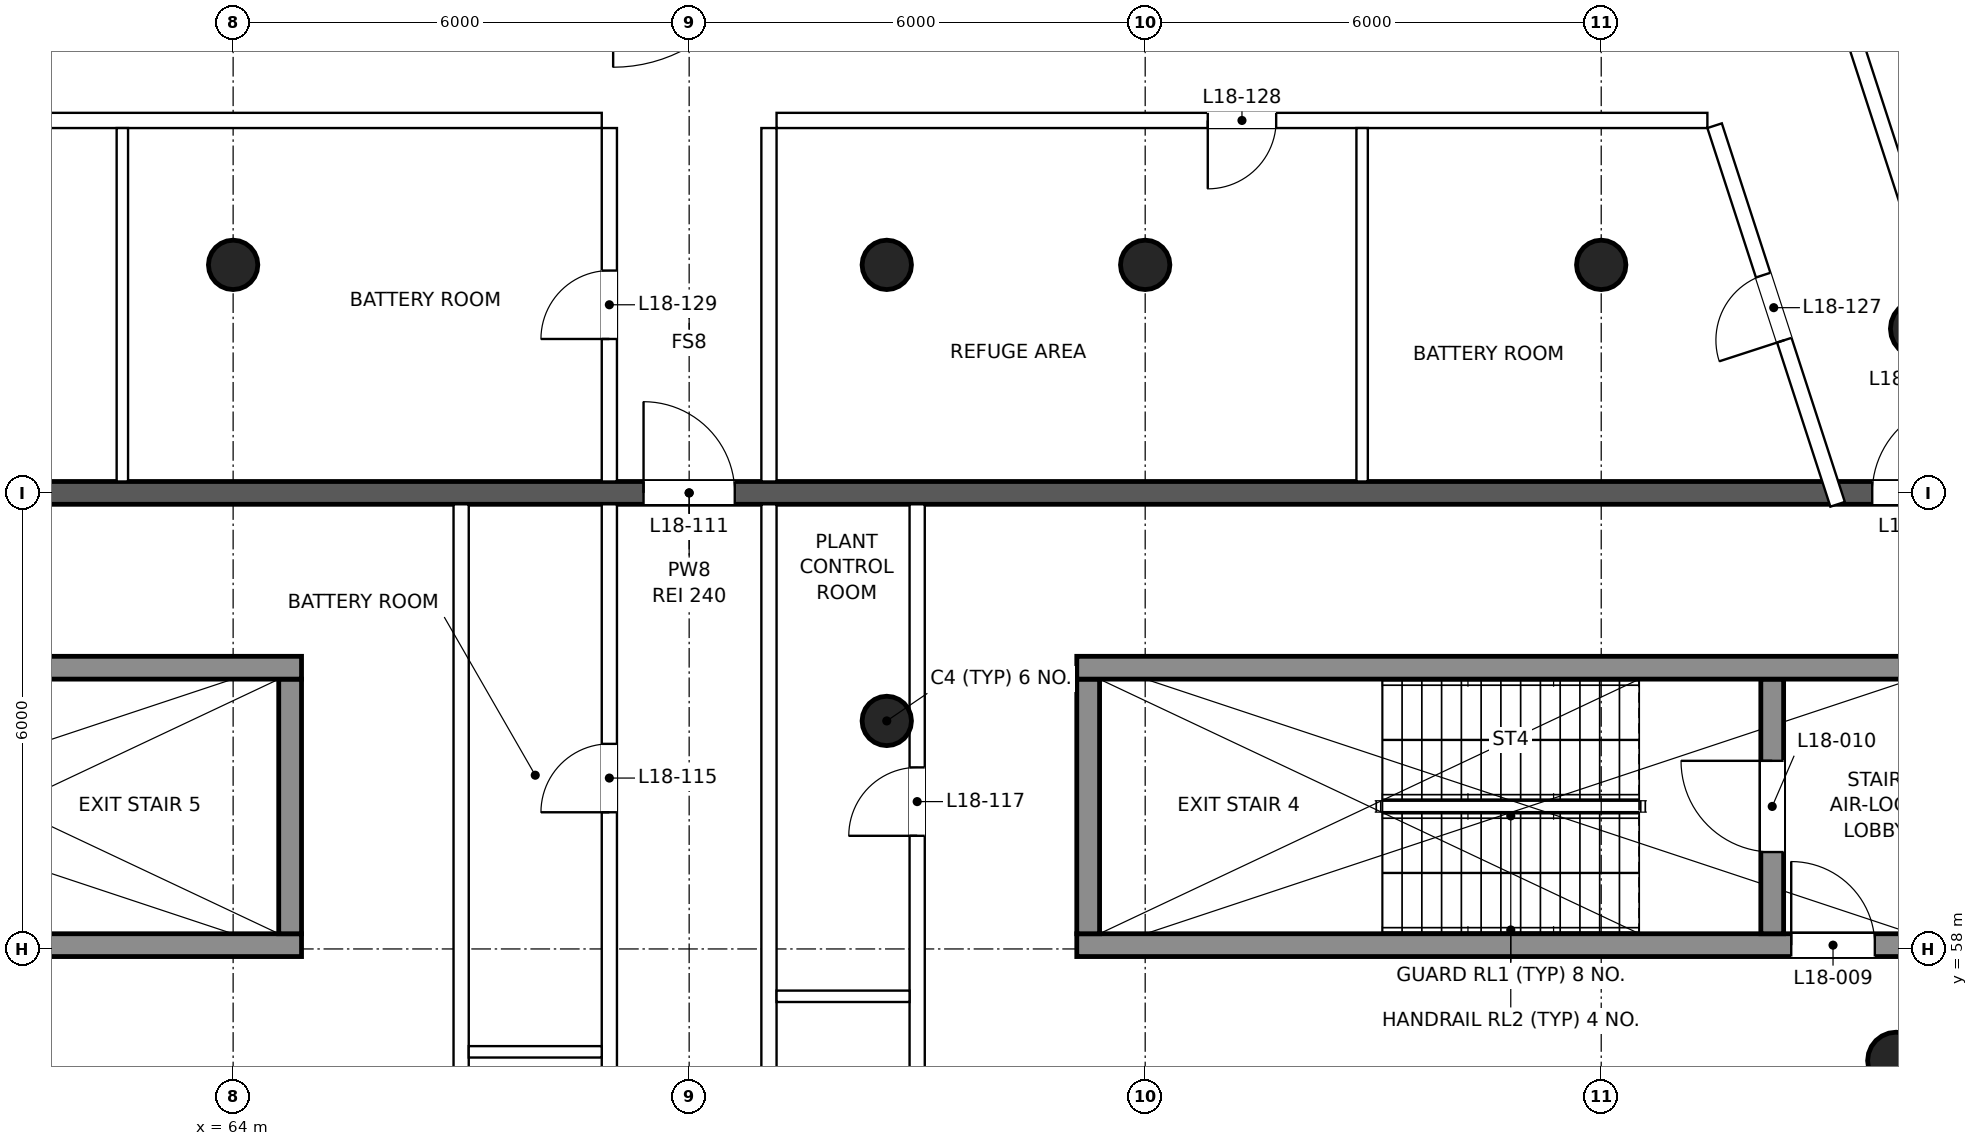
"""IFC4 building model, lengths in metres.
Left out: names, types, materials, properties, quantities, classifications, styles, units other than length and angle.
Written with IfcOpenShell. Run it as: python <this file> out.ifc"""

import sys

from ifc_helpers import new_model, si_unit, direction, frame, frame_2d, origin, origin_2d, place, context, subcontext, project, spatial, rectangle, circle, extrude, element, fill, save


model = new_model("IFC4")
c1 = context("Model", 3, precision=1e-05, world=origin(), true_north=direction((0.0, 1.0)))
c2 = subcontext(c1, "Body", "Model", "MODEL_VIEW")
j1 = project(units=[si_unit("LENGTHUNIT", "METRE"), si_unit("PLANEANGLEUNIT", "RADIAN")], contexts=[c1])
p1 = place(None, origin())
s1 = spatial("IfcSite", under=j1, at=p1, CompositionType="ELEMENT")
p2 = place(p1, origin())
s2 = spatial("IfcBuilding", under=s1, at=p2, CompositionType="ELEMENT")
p3 = place(p2, frame((0.0, 0.0, 85.8)))
s3 = spatial("IfcBuildingStorey", under=s2, at=p3, CompositionType="ELEMENT", Elevation=85.8)
for number, where, z_axis, x_axis in (
    (1, (85.88, 56.53, 0.0), (0.0, 0.0, 1.0), (1.0, 0.0, 0.0)),
    (2, (86.18, 66.16, 0.0), (0.0, 0.0, 1.0), (1.0, 0.0, 0.0)),
):
    element("IfcColumn", number, at=place(p3, frame(where, z_axis=z_axis, x_axis=x_axis)), inside=s3, PredefinedType="COLUMN", context=c2, shape_type="SweptSolid", body=[
        extrude(circle(Radius=0.375, at=origin_2d()), origin(), (0.0, 0.0, 1.0), 5.0),
    ])
for number, where, z_axis, x_axis in (
    (3, (64.0, 67.0, 0.0), (0.0, 0.0, 1.0), (1.0, 0.0, 0.0)),
    (4, (72.6, 61.0, 0.0), (0.0, 0.0, 1.0), (1.0, 0.0, 0.0)),
    (5, (72.6, 67.0, 0.0), (0.0, 0.0, 1.0), (1.0, 0.0, 0.0)),
    (6, (76.0, 67.0, 0.0), (0.0, 0.0, 1.0), (1.0, 0.0, 0.0)),
    (7, (82.0, 67.0, 0.0), (0.0, 0.0, 1.0), (1.0, 0.0, 0.0)),
):
    element("IfcColumn", number, at=place(p3, frame(where, z_axis=z_axis, x_axis=x_axis)), inside=s3, PredefinedType="COLUMN", context=c2, shape_type="SweptSolid", body=[
        extrude(circle(Radius=0.325, at=origin_2d()), origin(), (0.0, 0.0, 1.0), 5.0),
    ])
p4 = place(p3, frame((53.0, 58.05, 0.0), z_axis=(0.0, 0.0, 1.0), x_axis=(1.0, 0.0, 0.0)))
e8 = element("IfcWall", 8, at=p4, inside=s3, PredefinedType="SHEAR", context=c2, shape_type="SweptSolid", body=[
    extrude(rectangle(XDim=11.9, YDim=0.3, at=frame_2d((5.95, 0.0))), origin(), (0.0, 0.0, 1.0), 5.0),
])
p5 = place(p4, frame((1.4, 0.0, 0.0)))
e9 = element("IfcOpeningElement", 9, at=p5, cuts=e8, PredefinedType="OPENING", context=c2, shape_type="SweptSolid", body=[
    extrude(rectangle(XDim=1.1, YDim=2.1, at=frame_2d((0.55, 1.05))), frame((0.0, 0.16, 0.0), z_axis=(0.0, -1.0, 0.0), x_axis=(1.0, 0.0, 0.0)), (0.0, 0.0, 1.0), 0.32),
])
p6 = place(p3, frame((75.1, 58.05, 0.0), z_axis=(0.0, 0.0, 1.0), x_axis=(1.0, 0.0, 0.0)))
e10 = element("IfcWall", 10, at=p6, inside=s3, PredefinedType="SHEAR", context=c2, shape_type="SweptSolid", body=[
    extrude(rectangle(XDim=11.9, YDim=0.3, at=frame_2d((5.95, 0.0))), origin(), (0.0, 0.0, 1.0), 5.0),
])
p7 = place(p6, frame((9.4, 0.0, 0.0)))
e11 = element("IfcOpeningElement", 11, at=p7, cuts=e10, PredefinedType="OPENING", context=c2, shape_type="SweptSolid", body=[
    extrude(rectangle(XDim=1.1, YDim=2.1, at=frame_2d((0.55, 1.05))), frame((0.0, 0.16, 0.0), z_axis=(0.0, -1.0, 0.0), x_axis=(1.0, 0.0, 0.0)), (0.0, 0.0, 1.0), 0.32),
])
for number, where, z_axis, x_axis in (
    (12, (64.75, 58.2, 0.0), (0.0, 0.0, 1.0), (0.0, 1.0, 0.0)),
    (13, (75.25, 58.2, 0.0), (0.0, 0.0, 1.0), (0.0, 1.0, 0.0)),
):
    element("IfcWall", number, at=place(p3, frame(where, z_axis=z_axis, x_axis=x_axis)), inside=s3, PredefinedType="SHEAR", context=c2, shape_type="SweptSolid", body=[
        extrude(rectangle(XDim=3.35, YDim=0.3, at=frame_2d((1.675, 0.0))), origin(), (0.0, 0.0, 1.0), 5.0),
    ])
p8 = place(p3, frame((84.25, 58.2, 0.0), z_axis=(0.0, 0.0, 1.0), x_axis=(0.0, 1.0, 0.0)))
e14 = element("IfcWall", 14, at=p8, inside=s3, PredefinedType="SHEAR", context=c2, shape_type="SweptSolid", body=[
    extrude(rectangle(XDim=3.35, YDim=0.3, at=frame_2d((1.675, 0.0))), origin(), (0.0, 0.0, 1.0), 5.0),
])
p9 = place(p8, frame((1.075, 0.0, 0.0)))
e15 = element("IfcOpeningElement", 15, at=p9, cuts=e14, PredefinedType="OPENING", context=c2, shape_type="SweptSolid", body=[
    extrude(rectangle(XDim=1.2, YDim=2.1, at=frame_2d((0.6, 1.05))), frame((0.0, 0.16, 0.0), z_axis=(0.0, -1.0, 0.0), x_axis=(1.0, 0.0, 0.0)), (0.0, 0.0, 1.0), 0.32),
])
for number, where, z_axis, x_axis in (
    (16, (53.0, 61.7, 0.0), (0.0, 0.0, 1.0), (1.0, 0.0, 0.0)),
    (17, (75.1, 61.7, 0.0), (0.0, 0.0, 1.0), (1.0, 0.0, 0.0)),
):
    element("IfcWall", number, at=place(p3, frame(where, z_axis=z_axis, x_axis=x_axis)), inside=s3, PredefinedType="SHEAR", context=c2, shape_type="SweptSolid", body=[
        extrude(rectangle(XDim=11.9, YDim=0.3, at=frame_2d((5.95, 0.0))), origin(), (0.0, 0.0, 1.0), 5.0),
    ])
p10 = place(p3, frame((45.286, 64.0, 0.0), z_axis=(0.0, 0.0, 1.0), x_axis=(1.0, 0.0, 0.0)))
e18 = element("IfcWall", 18, at=p10, inside=s3, PredefinedType="PARTITIONING", context=c2, shape_type="SweptSolid", body=[
    extrude(rectangle(XDim=49.428, YDim=0.3, at=frame_2d((24.714, 0.0))), origin(), (0.0, 0.0, 1.0), 3.7),
])
p11 = place(p10, frame((7.948, 0.0, 0.0)))
e19 = element("IfcOpeningElement", 19, at=p11, cuts=e18, PredefinedType="OPENING", context=c2, shape_type="SweptSolid", body=[
    extrude(rectangle(XDim=1.2, YDim=2.1, at=frame_2d((0.6, 1.05))), frame((0.0, 0.16, 0.0), z_axis=(0.0, -1.0, 0.0), x_axis=(1.0, 0.0, 0.0)), (0.0, 0.0, 1.0), 0.32),
])
p12 = place(p10, frame((24.114, 0.0, 0.0)))
e20 = element("IfcOpeningElement", 20, at=p12, cuts=e18, PredefinedType="OPENING", context=c2, shape_type="SweptSolid", body=[
    extrude(rectangle(XDim=1.2, YDim=2.1, at=frame_2d((0.6, 1.05))), frame((0.0, 0.16, 0.0), z_axis=(0.0, -1.0, 0.0), x_axis=(1.0, 0.0, 0.0)), (0.0, 0.0, 1.0), 0.32),
])
p13 = place(p10, frame((40.28, 0.0, 0.0)))
e21 = element("IfcOpeningElement", 21, at=p13, cuts=e18, PredefinedType="OPENING", context=c2, shape_type="SweptSolid", body=[
    extrude(rectangle(XDim=1.2, YDim=2.1, at=frame_2d((0.6, 1.05))), frame((0.0, 0.16, 0.0), z_axis=(0.0, -1.0, 0.0), x_axis=(1.0, 0.0, 0.0)), (0.0, 0.0, 1.0), 0.32),
])
p14 = place(p3, frame((83.105, 76.818, 0.0), z_axis=(0.0, 0.0, 1.0), x_axis=(0.309020889227, -0.951055250772, 0.0)))
e22 = element("IfcWall", 22, at=p14, inside=s3, PredefinedType="PARTITIONING", context=c2, shape_type="SweptSolid", body=[
    extrude(rectangle(XDim=13.635, YDim=0.2, at=frame_2d((6.818, 0.0))), origin(), (0.0, 0.0, 1.0), 4.7),
])
p15 = place(p14, frame((6.368, 0.0, 0.0)))
e23 = element("IfcOpeningElement", 23, at=p15, cuts=e22, PredefinedType="OPENING", context=c2, shape_type="SweptSolid", body=[
    extrude(rectangle(XDim=0.9, YDim=2.1, at=frame_2d((0.45, 1.05))), frame((0.0, 0.11, 0.0), z_axis=(0.0, -1.0, 0.0), x_axis=(1.0, 0.0, 0.0)), (0.0, 0.0, 1.0), 0.22),
])
p16 = place(p14, frame((11.784, 0.0, 0.0)))
e24 = element("IfcOpeningElement", 24, at=p16, cuts=e22, PredefinedType="OPENING", context=c2, shape_type="SweptSolid", body=[
    extrude(rectangle(XDim=0.9, YDim=2.1, at=frame_2d((0.45, 1.05))), frame((0.0, 0.11, 0.0), z_axis=(0.0, -1.0, 0.0), x_axis=(1.0, 0.0, 0.0)), (0.0, 0.0, 1.0), 0.22),
])
p17 = place(p3, frame((85.11, 63.85, 0.0), z_axis=(0.0, 0.0, 1.0), x_axis=(-0.309030204086, 0.951052224099, 0.0)))
e25 = element("IfcWall", 25, at=p17, inside=s3, PredefinedType="PARTITIONING", context=c2, shape_type="SweptSolid", body=[
    extrude(rectangle(XDim=5.237, YDim=0.2, at=frame_2d((2.619, 0.0))), origin(), (0.0, 0.0, 1.0), 4.7),
])
p18 = place(p17, frame((2.27, 0.0, 0.0)))
e26 = element("IfcOpeningElement", 26, at=p18, cuts=e25, PredefinedType="OPENING", context=c2, shape_type="SweptSolid", body=[
    extrude(rectangle(XDim=0.9, YDim=2.1, at=frame_2d((0.45, 1.05))), frame((0.0, 0.11, 0.0), z_axis=(0.0, -1.0, 0.0), x_axis=(1.0, 0.0, 0.0)), (0.0, 0.0, 1.0), 0.22),
])
p19 = place(p3, frame((83.397, 68.9, 0.0), z_axis=(0.0, 0.0, 1.0), x_axis=(-1.0, 0.0, 0.0)))
e27 = element("IfcWall", 27, at=p19, inside=s3, PredefinedType="PARTITIONING", context=c2, shape_type="SweptSolid", body=[
    extrude(rectangle(XDim=12.247, YDim=0.2, at=frame_2d((6.124, 0.0))), origin(), (0.0, 0.0, 1.0), 4.7),
])
p20 = place(p19, frame((5.674, 0.0, 0.0)))
e28 = element("IfcOpeningElement", 28, at=p20, cuts=e27, PredefinedType="OPENING", context=c2, shape_type="SweptSolid", body=[
    extrude(rectangle(XDim=0.9, YDim=2.1, at=frame_2d((0.45, 1.05))), frame((0.0, 0.11, 0.0), z_axis=(0.0, -1.0, 0.0), x_axis=(1.0, 0.0, 0.0)), (0.0, 0.0, 1.0), 0.22),
])
p21 = place(p3, frame((71.05, 68.8, 0.0), z_axis=(0.0, 0.0, 1.0), x_axis=(0.0, -1.0, 0.0)))
e29 = element("IfcWall", 29, at=p21, inside=s3, PredefinedType="PARTITIONING", context=c2, shape_type="SweptSolid", body=[
    extrude(rectangle(XDim=4.65, YDim=0.2, at=frame_2d((2.325, 0.0))), origin(), (0.0, 0.0, 1.0), 4.7),
])
p22 = place(p3, frame((71.05, 63.85, 0.0), z_axis=(0.0, 0.0, 1.0), x_axis=(0.0, -1.0, 0.0)))
e30 = element("IfcWall", 30, at=p22, inside=s3, PredefinedType="PARTITIONING", context=c2, shape_type="SweptSolid", body=[
    extrude(rectangle(XDim=15.599, YDim=0.2, at=frame_2d((7.8, 0.0))), origin(), (0.0, 0.0, 1.0), 4.7),
])
p23 = place(p22, frame((10.469, 0.0, 0.0)))
e31 = element("IfcOpeningElement", 31, at=p23, cuts=e30, PredefinedType="OPENING", context=c2, shape_type="SweptSolid", body=[
    extrude(rectangle(XDim=0.9, YDim=2.1, at=frame_2d((0.45, 1.05))), frame((0.0, 0.11, 0.0), z_axis=(0.0, -1.0, 0.0), x_axis=(1.0, 0.0, 0.0)), (0.0, 0.0, 1.0), 0.22),
])
p24 = place(p3, frame((73.0, 55.9, 0.0), z_axis=(0.0, 0.0, 1.0), x_axis=(0.0, 1.0, 0.0)))
e32 = element("IfcWall", 32, at=p24, inside=s3, PredefinedType="PARTITIONING", context=c2, shape_type="SweptSolid", body=[
    extrude(rectangle(XDim=7.95, YDim=0.2, at=frame_2d((3.975, 0.0))), origin(), (0.0, 0.0, 1.0), 3.7),
])
p25 = place(p24, frame((3.589, 0.0, 0.0)))
e33 = element("IfcOpeningElement", 33, at=p25, cuts=e32, PredefinedType="OPENING", context=c2, shape_type="SweptSolid", body=[
    extrude(rectangle(XDim=0.9, YDim=2.1, at=frame_2d((0.45, 1.05))), frame((0.0, 0.11, 0.0), z_axis=(0.0, -1.0, 0.0), x_axis=(1.0, 0.0, 0.0)), (0.0, 0.0, 1.0), 0.22),
])
p26 = place(p3, frame((68.95, 48.251, 0.0), z_axis=(0.0, 0.0, 1.0), x_axis=(0.0, 1.0, 0.0)))
e34 = element("IfcWall", 34, at=p26, inside=s3, PredefinedType="PARTITIONING", context=c2, shape_type="SweptSolid", body=[
    extrude(rectangle(XDim=15.599, YDim=0.2, at=frame_2d((7.8, 0.0))), origin(), (0.0, 0.0, 1.0), 4.7),
])
p27 = place(p26, frame((3.865, 0.0, 0.0)))
e35 = element("IfcOpeningElement", 35, at=p27, cuts=e34, PredefinedType="OPENING", context=c2, shape_type="SweptSolid", body=[
    extrude(rectangle(XDim=0.9, YDim=2.1, at=frame_2d((0.45, 1.05))), frame((0.0, 0.11, 0.0), z_axis=(0.0, -1.0, 0.0), x_axis=(1.0, 0.0, 0.0)), (0.0, 0.0, 1.0), 0.22),
])
p28 = place(p26, frame((11.547, 0.0, 0.0)))
e36 = element("IfcOpeningElement", 36, at=p28, cuts=e34, PredefinedType="OPENING", context=c2, shape_type="SweptSolid", body=[
    extrude(rectangle(XDim=0.9, YDim=2.1, at=frame_2d((0.45, 1.05))), frame((0.0, 0.11, 0.0), z_axis=(0.0, -1.0, 0.0), x_axis=(1.0, 0.0, 0.0)), (0.0, 0.0, 1.0), 0.22),
])
p29 = place(p3, frame((68.95, 64.15, 0.0), z_axis=(0.0, 0.0, 1.0), x_axis=(0.0, 1.0, 0.0)))
e37 = element("IfcWall", 37, at=p29, inside=s3, PredefinedType="PARTITIONING", context=c2, shape_type="SweptSolid", body=[
    extrude(rectangle(XDim=4.65, YDim=0.2, at=frame_2d((2.325, 0.0))), origin(), (0.0, 0.0, 1.0), 4.7),
])
p30 = place(p29, frame((1.875, 0.0, 0.0)))
e38 = element("IfcOpeningElement", 38, at=p30, cuts=e37, PredefinedType="OPENING", context=c2, shape_type="SweptSolid", body=[
    extrude(rectangle(XDim=0.9, YDim=2.1, at=frame_2d((0.45, 1.05))), frame((0.0, 0.11, 0.0), z_axis=(0.0, -1.0, 0.0), x_axis=(1.0, 0.0, 0.0)), (0.0, 0.0, 1.0), 0.22),
])
p31 = place(p3, frame((68.85, 68.9, 0.0), z_axis=(0.0, 0.0, 1.0), x_axis=(-1.0, 0.0, 0.0)))
e39 = element("IfcWall", 39, at=p31, inside=s3, PredefinedType="PARTITIONING", context=c2, shape_type="SweptSolid", body=[
    extrude(rectangle(XDim=12.247, YDim=0.2, at=frame_2d((6.124, 0.0))), origin(), (0.0, 0.0, 1.0), 4.7),
])
p32 = place(p31, frame((8.712, 0.0, 0.0)))
e40 = element("IfcOpeningElement", 40, at=p32, cuts=e39, PredefinedType="OPENING", context=c2, shape_type="SweptSolid", body=[
    extrude(rectangle(XDim=0.9, YDim=2.1, at=frame_2d((0.45, 1.05))), frame((0.0, 0.11, 0.0), z_axis=(0.0, -1.0, 0.0), x_axis=(1.0, 0.0, 0.0)), (0.0, 0.0, 1.0), 0.22),
])
p33 = place(p3, frame((67.0, 63.85, 0.0), z_axis=(0.0, 0.0, 1.0), x_axis=(0.0, -1.0, 0.0)))
e41 = element("IfcWall", 41, at=p33, inside=s3, PredefinedType="PARTITIONING", context=c2, shape_type="SweptSolid", body=[
    extrude(rectangle(XDim=7.95, YDim=0.2, at=frame_2d((3.975, 0.0))), origin(), (0.0, 0.0, 1.0), 4.7),
])
p34 = place(p3, frame((67.1, 56.646, 0.0), z_axis=(0.0, 0.0, 1.0), x_axis=(1.0, 0.0, 0.0)))
e42 = element("IfcWall", 42, at=p34, inside=s3, PredefinedType="PARTITIONING", context=c2, shape_type="SweptSolid", body=[
    extrude(rectangle(XDim=1.75, YDim=0.15, at=frame_2d((0.875, 0.0))), origin(), (0.0, 0.0, 1.0), 4.7),
])
p35 = place(p3, frame((62.542, 64.15, 0.0), z_axis=(0.0, 0.0, 1.0), x_axis=(0.0, 1.0, 0.0)))
e43 = element("IfcWall", 43, at=p35, inside=s3, PredefinedType="PARTITIONING", context=c2, shape_type="SweptSolid", body=[
    extrude(rectangle(XDim=4.65, YDim=0.15, at=frame_2d((2.325, 0.0))), origin(), (0.0, 0.0, 1.0), 4.7),
])
p36 = place(p3, frame((71.15, 57.377, 0.0), z_axis=(0.0, 0.0, 1.0), x_axis=(1.0, 0.0, 0.0)))
e44 = element("IfcWall", 44, at=p36, inside=s3, PredefinedType="PARTITIONING", context=c2, shape_type="SweptSolid", body=[
    extrude(rectangle(XDim=1.75, YDim=0.15, at=frame_2d((0.875, 0.0))), origin(), (0.0, 0.0, 1.0), 4.7),
])
p37 = place(p3, frame((78.854, 64.15, 0.0), z_axis=(0.0, 0.0, 1.0), x_axis=(0.0, 1.0, 0.0)))
e45 = element("IfcWall", 45, at=p37, inside=s3, PredefinedType="PARTITIONING", context=c2, shape_type="SweptSolid", body=[
    extrude(rectangle(XDim=4.65, YDim=0.15, at=frame_2d((2.325, 0.0))), origin(), (0.0, 0.0, 1.0), 4.7),
])
p38 = place(p7, origin())
e46 = element("IfcDoor", 46, at=p38, inside=s3, OperationType="SINGLE_SWING_LEFT", PredefinedType="DOOR", context=c2, shape_type="SweptSolid", body=[
    extrude(rectangle(XDim=1.1, YDim=2.1, at=frame_2d((0.55, 1.05))), frame((0.0, 0.025, 0.0), z_axis=(0.0, -1.0, 0.0), x_axis=(1.0, 0.0, 0.0)), (0.0, 0.0, 1.0), 0.05),
])
fill(e11, e46)
p39 = place(p9, origin())
e47 = element("IfcDoor", 47, at=p39, inside=s3, OperationType="SINGLE_SWING_RIGHT", PredefinedType="DOOR", context=c2, shape_type="SweptSolid", body=[
    extrude(rectangle(XDim=1.2, YDim=2.1, at=frame_2d((0.6, 1.05))), frame((0.0, 0.025, 0.0), z_axis=(0.0, -1.0, 0.0), x_axis=(1.0, 0.0, 0.0)), (0.0, 0.0, 1.0), 0.05),
])
fill(e15, e47)
p40 = place(p12, origin())
e48 = element("IfcDoor", 48, at=p40, inside=s3, OperationType="SINGLE_SWING_LEFT", PredefinedType="DOOR", context=c2, shape_type="SweptSolid", body=[
    extrude(rectangle(XDim=1.2, YDim=2.1, at=frame_2d((0.6, 1.05))), frame((0.0, 0.025, 0.0), z_axis=(0.0, -1.0, 0.0), x_axis=(1.0, 0.0, 0.0)), (0.0, 0.0, 1.0), 0.05),
])
fill(e20, e48)
p41 = place(p13, origin())
e49 = element("IfcDoor", 49, at=p41, inside=s3, OperationType="SINGLE_SWING_RIGHT", PredefinedType="DOOR", context=c2, shape_type="SweptSolid", body=[
    extrude(rectangle(XDim=1.2, YDim=2.1, at=frame_2d((0.6, 1.05))), frame((0.0, 0.025, 0.0), z_axis=(0.0, -1.0, 0.0), x_axis=(1.0, 0.0, 0.0)), (0.0, 0.0, 1.0), 0.05),
])
fill(e21, e49)
p42 = place(p28, origin())
e50 = element("IfcDoor", 50, at=p42, inside=s3, OperationType="SINGLE_SWING_LEFT", PredefinedType="DOOR", context=c2, shape_type="SweptSolid", body=[
    extrude(rectangle(XDim=0.9, YDim=2.1, at=frame_2d((0.45, 1.05))), frame((0.0, 0.025, 0.0), z_axis=(0.0, -1.0, 0.0), x_axis=(1.0, 0.0, 0.0)), (0.0, 0.0, 1.0), 0.05),
])
fill(e36, e50)
p43 = place(p25, origin())
e51 = element("IfcDoor", 51, at=p43, inside=s3, OperationType="SINGLE_SWING_LEFT", PredefinedType="DOOR", context=c2, shape_type="SweptSolid", body=[
    extrude(rectangle(XDim=0.9, YDim=2.1, at=frame_2d((0.45, 1.05))), frame((0.0, 0.025, 0.0), z_axis=(0.0, -1.0, 0.0), x_axis=(1.0, 0.0, 0.0)), (0.0, 0.0, 1.0), 0.05),
])
fill(e33, e51)
p44 = place(p18, origin())
e52 = element("IfcDoor", 52, at=p44, inside=s3, OperationType="SINGLE_SWING_LEFT", PredefinedType="DOOR", context=c2, shape_type="SweptSolid", body=[
    extrude(rectangle(XDim=0.9, YDim=2.1, at=frame_2d((0.45, 1.05))), frame((0.0, 0.025, 0.0), z_axis=(0.0, -1.0, 0.0), x_axis=(1.0, 0.0, 0.0)), (0.0, 0.0, 1.0), 0.05),
])
fill(e26, e52)
p45 = place(p20, origin())
e53 = element("IfcDoor", 53, at=p45, inside=s3, OperationType="SINGLE_SWING_RIGHT", PredefinedType="DOOR", context=c2, shape_type="SweptSolid", body=[
    extrude(rectangle(XDim=0.9, YDim=2.1, at=frame_2d((0.45, 1.05))), frame((0.0, 0.025, 0.0), z_axis=(0.0, -1.0, 0.0), x_axis=(1.0, 0.0, 0.0)), (0.0, 0.0, 1.0), 0.05),
])
fill(e28, e53)
p46 = place(p30, origin())
e54 = element("IfcDoor", 54, at=p46, inside=s3, OperationType="SINGLE_SWING_LEFT", PredefinedType="DOOR", context=c2, shape_type="SweptSolid", body=[
    extrude(rectangle(XDim=0.9, YDim=2.1, at=frame_2d((0.45, 1.05))), frame((0.0, 0.025, 0.0), z_axis=(0.0, -1.0, 0.0), x_axis=(1.0, 0.0, 0.0)), (0.0, 0.0, 1.0), 0.05),
])
fill(e38, e54)
save(model, sys.argv[1])
